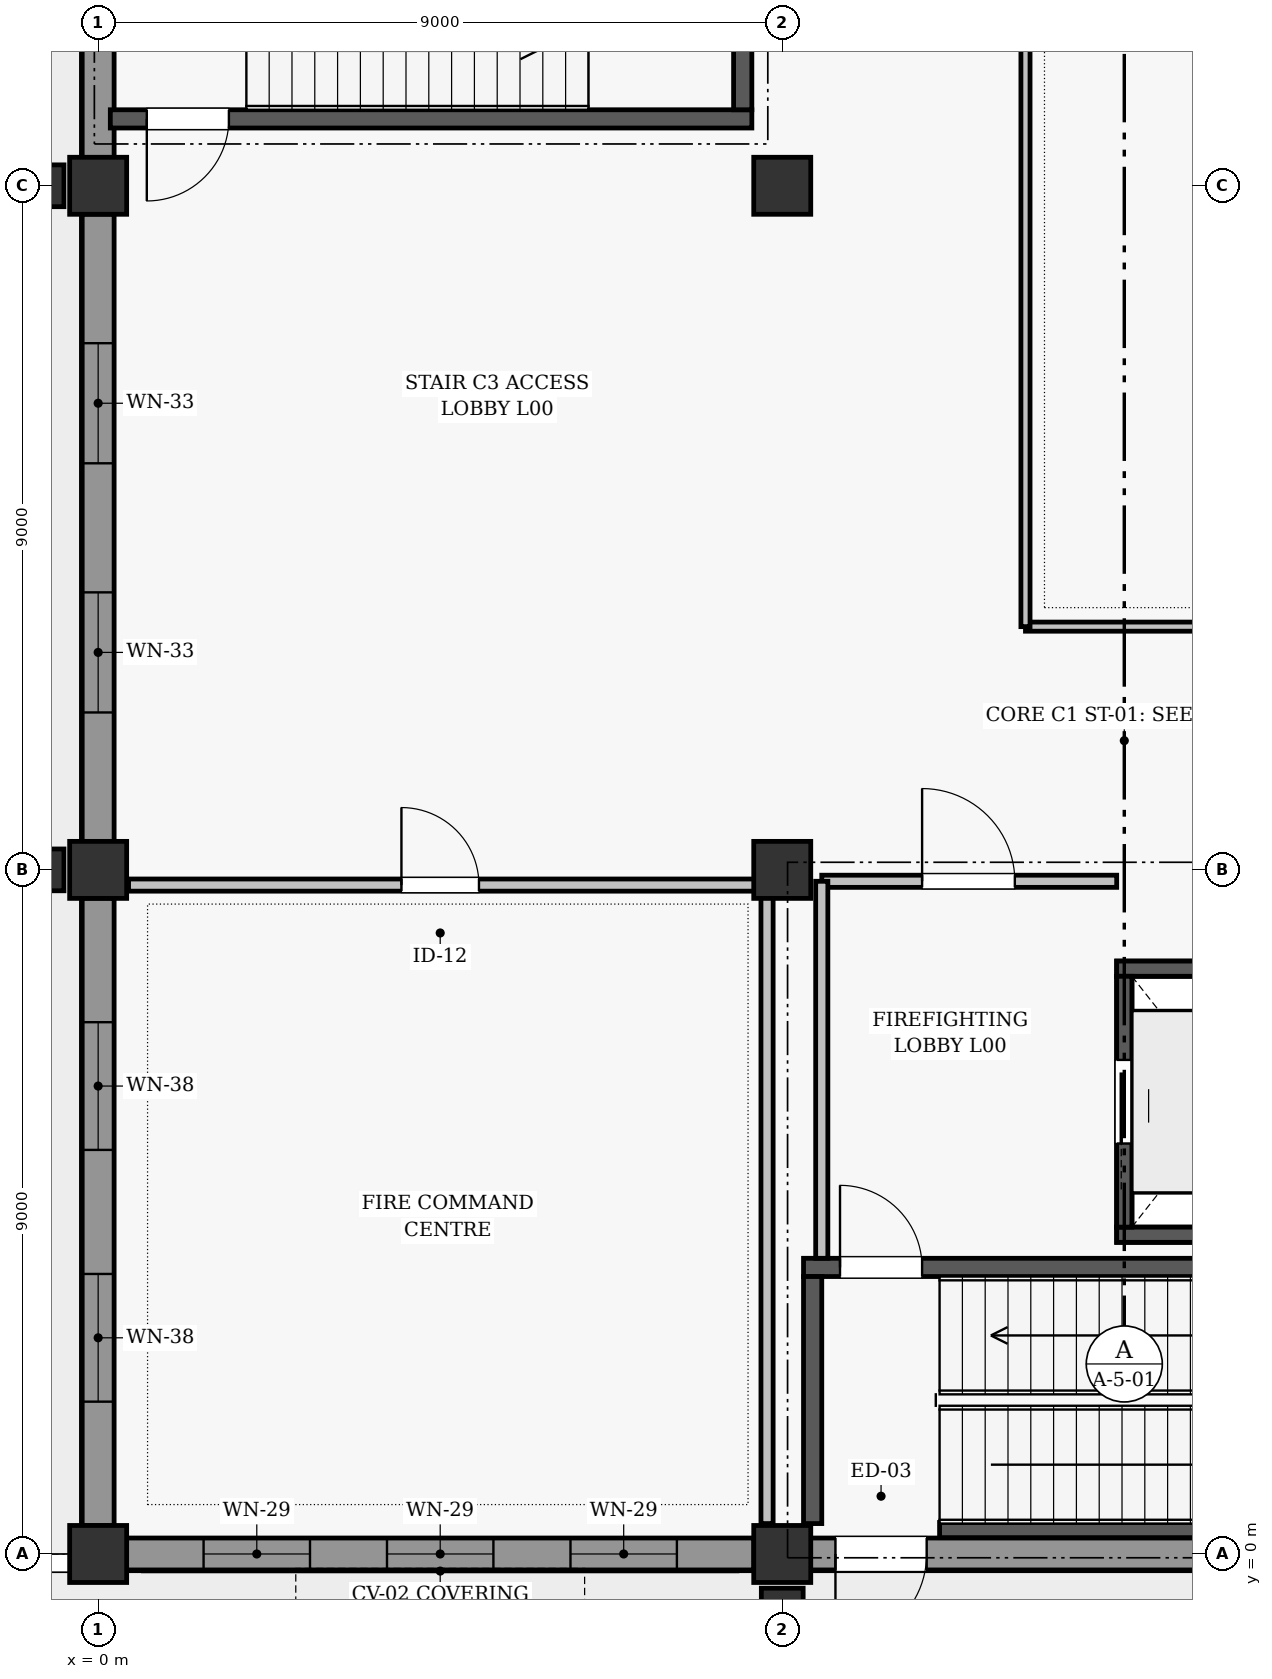
"""IFC4 building model, lengths in metres.
Left out: names, types, materials, properties, quantities, classifications, styles, units other than length and angle.
Written with IfcOpenShell. Run it as: python <this file> out.ifc"""

import sys

from ifc_helpers import new_model, si_unit, direction, frame, frame_2d, origin, origin_2d, place, context, subcontext, project, spatial, rectangle, extrude, element, fill, save


model = new_model("IFC4")
c1 = context("Model", 3, precision=1e-05, world=origin(), true_north=direction((0.0, 1.0)))
c2 = subcontext(c1, "Body", "Model", "MODEL_VIEW")
j1 = project(units=[si_unit("LENGTHUNIT", "METRE"), si_unit("PLANEANGLEUNIT", "RADIAN")], contexts=[c1])
p1 = place(None, origin())
s1 = spatial("IfcSite", under=j1, at=p1, CompositionType="ELEMENT")
p2 = place(p1, origin())
s2 = spatial("IfcBuilding", under=s1, at=p2, CompositionType="ELEMENT")
p3 = place(p2, origin())
s3 = spatial("IfcBuildingStorey", under=s2, at=p3, CompositionType="ELEMENT", Elevation=0.0)
for number, where, z_axis, x_axis in (
    (1, (0.0, 0.0, 0.0), (0.0, 0.0, 1.0), (1.0, 0.0, 0.0)),
    (2, (0.0, 9.0, 0.0), (0.0, 0.0, 1.0), (1.0, 0.0, 0.0)),
    (3, (0.0, 18.0, 0.0), (0.0, 0.0, 1.0), (1.0, 0.0, 0.0)),
    (4, (9.0, 0.0, 0.0), (0.0, 0.0, 1.0), (1.0, 0.0, 0.0)),
    (5, (9.0, 9.0, 0.0), (0.0, 0.0, 1.0), (1.0, 0.0, 0.0)),
    (6, (9.0, 18.0, 0.0), (0.0, 0.0, 1.0), (1.0, 0.0, 0.0)),
):
    element("IfcColumn", number, at=place(p3, frame(where, z_axis=z_axis, x_axis=x_axis)), inside=s3, PredefinedType="COLUMN", context=c2, shape_type="SweptSolid", body=[
        extrude(rectangle(XDim=0.75, YDim=0.75, at=origin_2d()), origin(), (0.0, 0.0, 1.0), 4.8),
    ])
for number, where, z_axis, x_axis in (
    (7, (9.0, -0.85, 0.0), (0.0, 0.0, 1.0), (1.0, 0.0, 0.0)),
    (8, (-0.85, 9.0, 0.0), (0.0, 0.0, 1.0), (0.0, 1.0, 0.0)),
    (9, (-0.85, 18.0, 0.0), (0.0, 0.0, 1.0), (0.0, 1.0, 0.0)),
):
    element("IfcColumn", number, at=place(p3, frame(where, z_axis=z_axis, x_axis=x_axis)), inside=s3, PredefinedType="PILASTER", context=c2, shape_type="SweptSolid", body=[
        extrude(rectangle(XDim=0.55, YDim=0.8, at=origin_2d()), origin(), (0.0, 0.0, 1.0), 4.8),
    ])
p4 = place(p3, frame((0.373, 0.0, 0.0), z_axis=(0.0, 0.0, 1.0), x_axis=(1.0, 0.0, 0.0)))
e10 = element("IfcWall", 10, at=p4, inside=s3, PredefinedType="SOLIDWALL", context=c2, shape_type="SweptSolid", body=[
    extrude(rectangle(XDim=8.254, YDim=0.42, at=frame_2d((4.127, 0.0))), origin(), (0.0, 0.0, 1.0), 3.842),
])
p5 = place(p4, frame((1.014, 0.0, 0.75)))
e11 = element("IfcOpeningElement", 11, at=p5, cuts=e10, PredefinedType="OPENING", context=c2, shape_type="SweptSolid", body=[
    extrude(rectangle(XDim=1.4, YDim=2.4, at=frame_2d((0.7, 1.2))), frame((0.0, 0.22, 0.0), z_axis=(0.0, -1.0, 0.0), x_axis=(1.0, 0.0, 0.0)), (0.0, 0.0, 1.0), 0.44),
])
p6 = place(p4, frame((3.427, 0.0, 0.75)))
e12 = element("IfcOpeningElement", 12, at=p6, cuts=e10, PredefinedType="OPENING", context=c2, shape_type="SweptSolid", body=[
    extrude(rectangle(XDim=1.4, YDim=2.4, at=frame_2d((0.7, 1.2))), frame((0.0, 0.22, 0.0), z_axis=(0.0, -1.0, 0.0), x_axis=(1.0, 0.0, 0.0)), (0.0, 0.0, 1.0), 0.44),
])
p7 = place(p4, frame((5.841, 0.0, 0.75)))
e13 = element("IfcOpeningElement", 13, at=p7, cuts=e10, PredefinedType="OPENING", context=c2, shape_type="SweptSolid", body=[
    extrude(rectangle(XDim=1.4, YDim=2.4, at=frame_2d((0.7, 1.2))), frame((0.0, 0.22, 0.0), z_axis=(0.0, -1.0, 0.0), x_axis=(1.0, 0.0, 0.0)), (0.0, 0.0, 1.0), 0.44),
])
p8 = place(p3, frame((9.373, 0.0, 0.0), z_axis=(0.0, 0.0, 1.0), x_axis=(1.0, 0.0, 0.0)))
e14 = element("IfcWall", 14, at=p8, inside=s3, PredefinedType="SOLIDWALL", context=c2, shape_type="SweptSolid", body=[
    extrude(rectangle(XDim=8.254, YDim=0.42, at=frame_2d((4.127, 0.0))), origin(), (0.0, 0.0, 1.0), 3.842),
])
p9 = place(p8, frame((0.327, 0.0, 0.0)))
e15 = element("IfcOpeningElement", 15, at=p9, cuts=e14, PredefinedType="OPENING", context=c2, shape_type="SweptSolid", body=[
    extrude(rectangle(XDim=1.2, YDim=2.18, at=frame_2d((0.6, 1.09))), frame((0.0, 0.22, 0.0), z_axis=(0.0, -1.0, 0.0), x_axis=(1.0, 0.0, 0.0)), (0.0, 0.0, 1.0), 0.44),
])
p10 = place(p3, frame((0.0, 0.373, 0.0), z_axis=(0.0, 0.0, 1.0), x_axis=(0.0, 1.0, 0.0)))
e16 = element("IfcWall", 16, at=p10, inside=s3, PredefinedType="SOLIDWALL", context=c2, shape_type="SweptSolid", body=[
    extrude(rectangle(XDim=8.254, YDim=0.42, at=frame_2d((4.127, 0.0))), origin(), (0.0, 0.0, 1.0), 4.042),
])
p11 = place(p10, frame((1.631, 0.0, 0.85)))
e17 = element("IfcOpeningElement", 17, at=p11, cuts=e16, PredefinedType="OPENING", context=c2, shape_type="SweptSolid", body=[
    extrude(rectangle(XDim=1.68, YDim=1.66, at=frame_2d((0.84, 0.83))), frame((0.0, 0.22, 0.0), z_axis=(0.0, -1.0, 0.0), x_axis=(1.0, 0.0, 0.0)), (0.0, 0.0, 1.0), 0.44),
])
p12 = place(p10, frame((4.943, 0.0, 0.85)))
e18 = element("IfcOpeningElement", 18, at=p12, cuts=e16, PredefinedType="OPENING", context=c2, shape_type="SweptSolid", body=[
    extrude(rectangle(XDim=1.68, YDim=1.66, at=frame_2d((0.84, 0.83))), frame((0.0, 0.22, 0.0), z_axis=(0.0, -1.0, 0.0), x_axis=(1.0, 0.0, 0.0)), (0.0, 0.0, 1.0), 0.44),
])
p13 = place(p3, frame((0.0, 9.373, 0.0), z_axis=(0.0, 0.0, 1.0), x_axis=(0.0, 1.0, 0.0)))
e19 = element("IfcWall", 19, at=p13, inside=s3, PredefinedType="SOLIDWALL", context=c2, shape_type="SweptSolid", body=[
    extrude(rectangle(XDim=8.254, YDim=0.42, at=frame_2d((4.127, 0.0))), origin(), (0.0, 0.0, 1.0), 4.042),
])
p14 = place(p13, frame((1.698, 0.0, 0.85)))
e20 = element("IfcOpeningElement", 20, at=p14, cuts=e19, PredefinedType="OPENING", context=c2, shape_type="SweptSolid", body=[
    extrude(rectangle(XDim=1.58, YDim=1.6, at=frame_2d((0.79, 0.8))), frame((0.0, 0.22, 0.0), z_axis=(0.0, -1.0, 0.0), x_axis=(1.0, 0.0, 0.0)), (0.0, 0.0, 1.0), 0.44),
])
p15 = place(p13, frame((4.976, 0.0, 0.85)))
e21 = element("IfcOpeningElement", 21, at=p15, cuts=e19, PredefinedType="OPENING", context=c2, shape_type="SweptSolid", body=[
    extrude(rectangle(XDim=1.58, YDim=1.6, at=frame_2d((0.79, 0.8))), frame((0.0, 0.22, 0.0), z_axis=(0.0, -1.0, 0.0), x_axis=(1.0, 0.0, 0.0)), (0.0, 0.0, 1.0), 0.44),
])
p16 = place(p3, frame((0.0, 18.373, 0.0), z_axis=(0.0, 0.0, 1.0), x_axis=(0.0, 1.0, 0.0)))
e22 = element("IfcWall", 22, at=p16, inside=s3, PredefinedType="SOLIDWALL", context=c2, shape_type="SweptSolid", body=[
    extrude(rectangle(XDim=8.254, YDim=0.42, at=frame_2d((4.127, 0.0))), origin(), (0.0, 0.0, 1.0), 4.042),
])
p17 = place(p16, frame((1.687, 0.0, 0.0)))
e23 = element("IfcOpeningElement", 23, at=p17, cuts=e22, PredefinedType="OPENING", context=c2, shape_type="SweptSolid", body=[
    extrude(rectangle(XDim=1.12, YDim=2.14, at=frame_2d((0.56, 1.07))), frame((0.0, 0.22, 0.0), z_axis=(0.0, -1.0, 0.0), x_axis=(1.0, 0.0, 0.0)), (0.0, 0.0, 1.0), 0.44),
])
p18 = place(p3, frame((11.07, 0.315, 0.0), z_axis=(0.0, 0.0, 1.0), x_axis=(1.0, 0.0, 0.0)))
e24 = element("IfcWall", 24, at=p18, inside=s3, PredefinedType="SHEAR", context=c2, shape_type="SweptSolid", body=[
    extrude(rectangle(XDim=6.41, YDim=0.2, at=frame_2d((3.205, 0.0))), origin(), (0.0, 0.0, 1.0), 4.55),
])
p19 = place(p3, frame((9.28, 3.77, 0.0), z_axis=(0.0, 0.0, 1.0), x_axis=(1.0, 0.0, 0.0)))
e25 = element("IfcWall", 25, at=p19, inside=s3, PredefinedType="SHEAR", context=c2, shape_type="SweptSolid", body=[
    extrude(rectangle(XDim=8.44, YDim=0.24, at=frame_2d((4.22, 0.0))), origin(), (0.0, 0.0, 1.0), 4.55),
])
p20 = place(p19, frame((0.48, 0.0, 0.0)))
e26 = element("IfcOpeningElement", 26, at=p20, cuts=e25, PredefinedType="OPENING", context=c2, shape_type="SweptSolid", body=[
    extrude(rectangle(XDim=1.08, YDim=2.08, at=frame_2d((0.54, 1.04))), frame((0.0, 0.13, 0.0), z_axis=(0.0, -1.0, 0.0), x_axis=(1.0, 0.0, 0.0)), (0.0, 0.0, 1.0), 0.26),
])
p21 = place(p3, frame((9.4, 0.4, 0.0), z_axis=(0.0, 0.0, 1.0), x_axis=(0.0, 1.0, 0.0)))
e27 = element("IfcWall", 27, at=p21, inside=s3, PredefinedType="SHEAR", context=c2, shape_type="SweptSolid", body=[
    extrude(rectangle(XDim=3.25, YDim=0.24, at=frame_2d((1.625, 0.0))), origin(), (0.0, 0.0, 1.0), 4.55),
])
p22 = place(p3, frame((0.16, 18.88, 0.0), z_axis=(0.0, 0.0, 1.0), x_axis=(1.0, 0.0, 0.0)))
e28 = element("IfcWall", 28, at=p22, inside=s3, PredefinedType="SHEAR", context=c2, shape_type="SweptSolid", body=[
    extrude(rectangle(XDim=8.44, YDim=0.24, at=frame_2d((4.22, 0.0))), origin(), (0.0, 0.0, 1.0), 4.55),
])
p23 = place(p22, frame((0.48, 0.0, 0.0)))
e29 = element("IfcOpeningElement", 29, at=p23, cuts=e28, PredefinedType="OPENING", context=c2, shape_type="SweptSolid", body=[
    extrude(rectangle(XDim=1.08, YDim=2.08, at=frame_2d((0.54, 1.04))), frame((0.0, 0.13, 0.0), z_axis=(0.0, -1.0, 0.0), x_axis=(1.0, 0.0, 0.0)), (0.0, 0.0, 1.0), 0.26),
])
p24 = place(p3, frame((8.48, 19.0, 0.0), z_axis=(0.0, 0.0, 1.0), x_axis=(0.0, 1.0, 0.0)))
e30 = element("IfcWall", 30, at=p24, inside=s3, PredefinedType="SHEAR", context=c2, shape_type="SweptSolid", body=[
    extrude(rectangle(XDim=3.25, YDim=0.24, at=frame_2d((1.625, 0.0))), origin(), (0.0, 0.0, 1.0), 4.55),
])
for number, where, z_axis, x_axis in (
    (31, (13.4, 4.2, -1.4), (0.0, 0.0, 1.0), (1.0, 0.0, 0.0)),
    (32, (13.4, 7.7, -1.4), (0.0, 0.0, 1.0), (1.0, 0.0, 0.0)),
):
    element("IfcWall", number, at=place(p3, frame(where, z_axis=z_axis, x_axis=x_axis)), inside=s3, PredefinedType="SHEAR", context=c2, shape_type="SweptSolid", body=[
        extrude(rectangle(XDim=3.0, YDim=0.2, at=frame_2d((1.5, 0.0))), origin(), (0.0, 0.0, 1.0), 1.1),
    ])
p25 = place(p3, frame((13.5, 4.3, -1.4), z_axis=(0.0, 0.0, 1.0), x_axis=(0.0, 1.0, 0.0)))
e33 = element("IfcWall", 33, at=p25, inside=s3, PredefinedType="SHEAR", context=c2, shape_type="SweptSolid", body=[
    extrude(rectangle(XDim=3.3, YDim=0.2, at=frame_2d((1.65, 0.0))), origin(), (0.0, 0.0, 1.0), 1.1),
])
for number, where, z_axis, x_axis in (
    (34, (13.4, 4.2, 0.0), (0.0, 0.0, 1.0), (1.0, 0.0, 0.0)),
    (35, (13.4, 7.7, 0.0), (0.0, 0.0, 1.0), (1.0, 0.0, 0.0)),
):
    element("IfcWall", number, at=place(p3, frame(where, z_axis=z_axis, x_axis=x_axis)), inside=s3, PredefinedType="SHEAR", context=c2, shape_type="SweptSolid", body=[
        extrude(rectangle(XDim=3.0, YDim=0.2, at=frame_2d((1.5, 0.0))), origin(), (0.0, 0.0, 1.0), 4.55),
    ])
p26 = place(p3, frame((13.5, 4.3, 0.0), z_axis=(0.0, 0.0, 1.0), x_axis=(0.0, 1.0, 0.0)))
e36 = element("IfcWall", 36, at=p26, inside=s3, PredefinedType="SHEAR", context=c2, shape_type="SweptSolid", body=[
    extrude(rectangle(XDim=3.3, YDim=0.2, at=frame_2d((1.65, 0.0))), origin(), (0.0, 0.0, 1.0), 4.55),
])
p27 = place(p26, frame((1.1, 0.0, 0.0)))
e37 = element("IfcOpeningElement", 37, at=p27, cuts=e36, PredefinedType="OPENING", context=c2, shape_type="SweptSolid", body=[
    extrude(rectangle(XDim=1.1, YDim=2.1, at=frame_2d((0.55, 1.05))), frame((0.0, 0.11, 0.0), z_axis=(0.0, -1.0, 0.0), x_axis=(1.0, 0.0, 0.0)), (0.0, 0.0, 1.0), 0.22),
])
p28 = place(p3, frame((9.52, 8.85, 0.0), z_axis=(0.0, 0.0, 1.0), x_axis=(1.0, 0.0, 0.0)))
e38 = element("IfcWall", 38, at=p28, inside=s3, PredefinedType="PARTITIONING", context=c2, shape_type="SweptSolid", body=[
    extrude(rectangle(XDim=3.88, YDim=0.16, at=frame_2d((1.94, 0.0))), origin(), (0.0, 0.0, 1.0), 3.795),
])
p29 = place(p28, frame((1.32, 0.0, 0.0)))
e39 = element("IfcOpeningElement", 39, at=p29, cuts=e38, PredefinedType="OPENING", context=c2, shape_type="SweptSolid", body=[
    extrude(rectangle(XDim=1.22, YDim=2.12, at=frame_2d((0.61, 1.06))), frame((0.0, 0.09, 0.0), z_axis=(0.0, -1.0, 0.0), x_axis=(1.0, 0.0, 0.0)), (0.0, 0.0, 1.0), 0.18),
])
p30 = place(p3, frame((9.52, 3.89, 0.0), z_axis=(0.0, 0.0, 1.0), x_axis=(0.0, 1.0, 0.0)))
e40 = element("IfcWall", 40, at=p30, inside=s3, PredefinedType="PARTITIONING", context=c2, shape_type="SweptSolid", body=[
    extrude(rectangle(XDim=4.96, YDim=0.16, at=frame_2d((2.48, 0.0))), origin(), (0.0, 0.0, 1.0), 3.795),
])
p31 = place(p3, frame((0.4, 8.8, 0.0), z_axis=(0.0, 0.0, 1.0), x_axis=(1.0, 0.0, 0.0)))
e41 = element("IfcWall", 41, at=p31, inside=s3, PredefinedType="PARTITIONING", context=c2, shape_type="SweptSolid", body=[
    extrude(rectangle(XDim=8.4, YDim=0.16, at=frame_2d((4.2, 0.0))), origin(), (0.0, 0.0, 1.0), 3.795),
])
p32 = place(p31, frame((3.59, 0.0, 0.0)))
e42 = element("IfcOpeningElement", 42, at=p32, cuts=e41, PredefinedType="OPENING", context=c2, shape_type="SweptSolid", body=[
    extrude(rectangle(XDim=1.02, YDim=2.1, at=frame_2d((0.51, 1.05))), frame((0.0, 0.09, 0.0), z_axis=(0.0, -1.0, 0.0), x_axis=(1.0, 0.0, 0.0)), (0.0, 0.0, 1.0), 0.18),
])
p33 = place(p3, frame((8.8, 0.4, 0.0), z_axis=(0.0, 0.0, 1.0), x_axis=(0.0, 1.0, 0.0)))
e43 = element("IfcWall", 43, at=p33, inside=s3, PredefinedType="PARTITIONING", context=c2, shape_type="SweptSolid", body=[
    extrude(rectangle(XDim=8.4, YDim=0.16, at=frame_2d((4.2, 0.0))), origin(), (0.0, 0.0, 1.0), 3.895),
])
p34 = place(p3, frame((12.2, 12.2, 0.0), z_axis=(0.0, 0.0, 1.0), x_axis=(1.0, 0.0, 0.0)))
e44 = element("IfcWall", 44, at=p34, inside=s3, PredefinedType="PARTITIONING", context=c2, shape_type="SweptSolid", body=[
    extrude(rectangle(XDim=23.4, YDim=0.12, at=frame_2d((11.7, 0.0))), origin(), (0.0, 0.0, 1.0), 3.895),
])
p35 = place(p34, frame((9.49, 0.0, 0.0)))
e45 = element("IfcOpeningElement", 45, at=p35, cuts=e44, PredefinedType="OPENING", context=c2, shape_type="SweptSolid", body=[
    extrude(rectangle(XDim=1.62, YDim=2.14, at=frame_2d((0.81, 1.07))), frame((0.0, 0.07, 0.0), z_axis=(0.0, -1.0, 0.0), x_axis=(1.0, 0.0, 0.0)), (0.0, 0.0, 1.0), 0.14),
])
p36 = place(p3, frame((12.2, 12.2, 0.0), z_axis=(0.0, 0.0, 1.0), x_axis=(0.0, 1.0, 0.0)))
e46 = element("IfcWall", 46, at=p36, inside=s3, PredefinedType="PARTITIONING", context=c2, shape_type="SweptSolid", body=[
    extrude(rectangle(XDim=14.4, YDim=0.12, at=frame_2d((7.2, 0.0))), origin(), (0.0, 0.0, 1.0), 3.795),
])
p37 = place(p5, origin())
e47 = element("IfcWindow", 47, at=p37, inside=s3, PartitioningType="SINGLE_PANEL", PredefinedType="WINDOW", context=c2, shape_type="SweptSolid", body=[
    extrude(rectangle(XDim=1.4, YDim=2.4, at=frame_2d((0.7, 1.2))), frame((0.0, 0.03, 0.0), z_axis=(0.0, -1.0, 0.0), x_axis=(1.0, 0.0, 0.0)), (0.0, 0.0, 1.0), 0.06),
])
fill(e11, e47)
p38 = place(p6, origin())
e48 = element("IfcWindow", 48, at=p38, inside=s3, PartitioningType="SINGLE_PANEL", PredefinedType="WINDOW", context=c2, shape_type="SweptSolid", body=[
    extrude(rectangle(XDim=1.4, YDim=2.4, at=frame_2d((0.7, 1.2))), frame((0.0, 0.03, 0.0), z_axis=(0.0, -1.0, 0.0), x_axis=(1.0, 0.0, 0.0)), (0.0, 0.0, 1.0), 0.06),
])
fill(e12, e48)
p39 = place(p7, origin())
e49 = element("IfcWindow", 49, at=p39, inside=s3, PartitioningType="SINGLE_PANEL", PredefinedType="WINDOW", context=c2, shape_type="SweptSolid", body=[
    extrude(rectangle(XDim=1.4, YDim=2.4, at=frame_2d((0.7, 1.2))), frame((0.0, 0.03, 0.0), z_axis=(0.0, -1.0, 0.0), x_axis=(1.0, 0.0, 0.0)), (0.0, 0.0, 1.0), 0.06),
])
fill(e13, e49)
p40 = place(p9, frame((1.2, 0.0, 0.0), z_axis=(0.0, 0.0, 1.0), x_axis=(-1.0, 0.0, 0.0)))
e50 = element("IfcDoor", 50, at=p40, inside=s3, OperationType="SINGLE_SWING_LEFT", PredefinedType="DOOR", context=c2, shape_type="SweptSolid", body=[
    extrude(rectangle(XDim=1.2, YDim=2.18, at=frame_2d((0.6, 1.09))), frame((0.0, 0.025, 0.0), z_axis=(0.0, -1.0, 0.0), x_axis=(1.0, 0.0, 0.0)), (0.0, 0.0, 1.0), 0.05),
])
fill(e15, e50)
p41 = place(p11, origin())
e51 = element("IfcWindow", 51, at=p41, inside=s3, PartitioningType="SINGLE_PANEL", PredefinedType="WINDOW", context=c2, shape_type="SweptSolid", body=[
    extrude(rectangle(XDim=1.68, YDim=1.66, at=frame_2d((0.84, 0.83))), frame((0.0, 0.03, 0.0), z_axis=(0.0, -1.0, 0.0), x_axis=(1.0, 0.0, 0.0)), (0.0, 0.0, 1.0), 0.06),
])
fill(e17, e51)
p42 = place(p12, origin())
e52 = element("IfcWindow", 52, at=p42, inside=s3, PartitioningType="SINGLE_PANEL", PredefinedType="WINDOW", context=c2, shape_type="SweptSolid", body=[
    extrude(rectangle(XDim=1.68, YDim=1.66, at=frame_2d((0.84, 0.83))), frame((0.0, 0.03, 0.0), z_axis=(0.0, -1.0, 0.0), x_axis=(1.0, 0.0, 0.0)), (0.0, 0.0, 1.0), 0.06),
])
fill(e18, e52)
p43 = place(p14, origin())
e53 = element("IfcWindow", 53, at=p43, inside=s3, PartitioningType="SINGLE_PANEL", PredefinedType="WINDOW", context=c2, shape_type="SweptSolid", body=[
    extrude(rectangle(XDim=1.58, YDim=1.6, at=frame_2d((0.79, 0.8))), frame((0.0, 0.03, 0.0), z_axis=(0.0, -1.0, 0.0), x_axis=(1.0, 0.0, 0.0)), (0.0, 0.0, 1.0), 0.06),
])
fill(e20, e53)
p44 = place(p15, origin())
e54 = element("IfcWindow", 54, at=p44, inside=s3, PartitioningType="SINGLE_PANEL", PredefinedType="WINDOW", context=c2, shape_type="SweptSolid", body=[
    extrude(rectangle(XDim=1.58, YDim=1.6, at=frame_2d((0.79, 0.8))), frame((0.0, 0.03, 0.0), z_axis=(0.0, -1.0, 0.0), x_axis=(1.0, 0.0, 0.0)), (0.0, 0.0, 1.0), 0.06),
])
fill(e21, e54)
p45 = place(p20, origin())
e55 = element("IfcDoor", 55, at=p45, inside=s3, OperationType="SINGLE_SWING_LEFT", PredefinedType="DOOR", context=c2, shape_type="SweptSolid", body=[
    extrude(rectangle(XDim=1.08, YDim=2.08, at=frame_2d((0.54, 1.04))), frame((0.0, 0.025, 0.0), z_axis=(0.0, -1.0, 0.0), x_axis=(1.0, 0.0, 0.0)), (0.0, 0.0, 1.0), 0.05),
])
fill(e26, e55)
p46 = place(p23, frame((1.08, 0.0, 0.0), z_axis=(0.0, 0.0, 1.0), x_axis=(-1.0, 0.0, 0.0)))
e56 = element("IfcDoor", 56, at=p46, inside=s3, OperationType="SINGLE_SWING_LEFT", PredefinedType="DOOR", context=c2, shape_type="SweptSolid", body=[
    extrude(rectangle(XDim=1.08, YDim=2.08, at=frame_2d((0.54, 1.04))), frame((0.0, 0.025, 0.0), z_axis=(0.0, -1.0, 0.0), x_axis=(1.0, 0.0, 0.0)), (0.0, 0.0, 1.0), 0.05),
])
fill(e29, e56)
p47 = place(p27, origin())
e57 = element("IfcDoor", 57, at=p47, inside=s3, OperationType="SLIDING_TO_LEFT", PredefinedType="DOOR", context=c2, shape_type="SweptSolid", body=[
    extrude(rectangle(XDim=1.1, YDim=2.1, at=frame_2d((0.55, 1.05))), frame((0.0, 0.025, 0.0), z_axis=(0.0, -1.0, 0.0), x_axis=(1.0, 0.0, 0.0)), (0.0, 0.0, 1.0), 0.05),
])
fill(e37, e57)
p48 = place(p29, origin())
e58 = element("IfcDoor", 58, at=p48, inside=s3, OperationType="SINGLE_SWING_LEFT", PredefinedType="DOOR", context=c2, shape_type="SweptSolid", body=[
    extrude(rectangle(XDim=1.22, YDim=2.12, at=frame_2d((0.61, 1.06))), frame((0.0, 0.025, 0.0), z_axis=(0.0, -1.0, 0.0), x_axis=(1.0, 0.0, 0.0)), (0.0, 0.0, 1.0), 0.05),
])
fill(e39, e58)
p49 = place(p32, origin())
e59 = element("IfcDoor", 59, at=p49, inside=s3, OperationType="SINGLE_SWING_LEFT", PredefinedType="DOOR", context=c2, shape_type="SweptSolid", body=[
    extrude(rectangle(XDim=1.02, YDim=2.1, at=frame_2d((0.51, 1.05))), frame((0.0, 0.025, 0.0), z_axis=(0.0, -1.0, 0.0), x_axis=(1.0, 0.0, 0.0)), (0.0, 0.0, 1.0), 0.05),
])
fill(e42, e59)
save(model, sys.argv[1])
